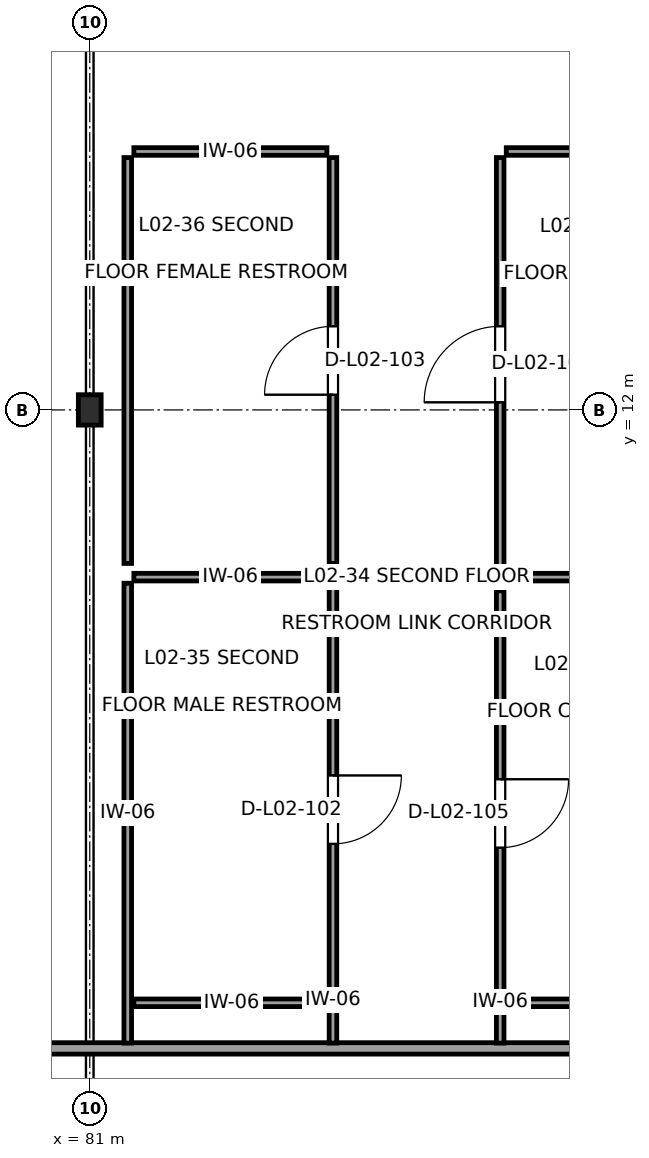
"""IFC4 building model, lengths in metres.
Left out: names, types, materials, properties, quantities, classifications, styles, units other than length and angle.
Written with IfcOpenShell. Run it as: python <this file> out.ifc"""

import sys

from ifc_helpers import new_model, si_unit, direction, frame, frame_2d, origin, origin_2d, place, context, subcontext, project, spatial, rectangle, i_section, extrude, element, fill, save


model = new_model("IFC4")
c1 = context("Model", 3, precision=1e-05, world=origin(), true_north=direction((0.0, 1.0)))
c2 = subcontext(c1, "Body", "Model", "MODEL_VIEW")
j1 = project(units=[si_unit("LENGTHUNIT", "METRE"), si_unit("PLANEANGLEUNIT", "RADIAN")], contexts=[c1])
p1 = place(None, origin())
s1 = spatial("IfcSite", under=j1, at=p1, CompositionType="ELEMENT")
p2 = place(p1, origin())
s2 = spatial("IfcBuilding", under=s1, at=p2, CompositionType="ELEMENT")
p3 = place(p2, frame((0.0, 0.0, 9.9)))
s3 = spatial("IfcBuildingStorey", under=s2, at=p3, CompositionType="ELEMENT", Elevation=9.9)
p4 = place(p3, frame((81.0, 12.0, 0.0), z_axis=(0.0, 0.0, 1.0), x_axis=(1.0, 0.0, 0.0)))
e1 = element("IfcColumn", 1, at=p4, inside=s3, PredefinedType="COLUMN", context=c2, shape_type="SweptSolid", body=[
    extrude(i_section(OverallWidth=0.3, OverallDepth=0.4, WebThickness=0.013, FlangeThickness=0.024, at=origin_2d()), origin(), (0.0, 0.0, 1.0), 4.5),
])
p5 = place(p3, frame((46.08, 3.6, 0.0), z_axis=(0.0, 0.0, 1.0), x_axis=(1.0, 0.0, 0.0)))
e2 = element("IfcWall", 2, at=p5, inside=s3, PredefinedType="PARTITIONING", context=c2, shape_type="SweptSolid", body=[
    extrude(rectangle(XDim=71.04, YDim=0.15, at=frame_2d((35.52, 0.0))), origin(), (0.0, 0.0, 1.0), 4.14),
])
p6 = place(p5, frame((27.595, 0.0, 0.0)))
e3 = element("IfcOpeningElement", 3, at=p6, cuts=e2, PredefinedType="OPENING", context=c2, shape_type="SweptSolid", body=[
    extrude(rectangle(XDim=1.05, YDim=2.25, at=frame_2d((0.525, 1.125))), frame((0.0, 0.09, 0.0), z_axis=(0.0, -1.0, 0.0), x_axis=(1.0, 0.0, 0.0)), (0.0, 0.0, 1.0), 0.18),
])
p7 = place(p3, frame((84.2, 9.72, 0.0), z_axis=(0.0, 0.0, 1.0), x_axis=(0.0, -1.0, 0.0)))
e4 = element("IfcWall", 4, at=p7, inside=s3, PredefinedType="PARTITIONING", context=c2, shape_type="SweptSolid", body=[
    extrude(rectangle(XDim=6.05, YDim=0.1, at=frame_2d((3.025, 0.0))), origin(), (0.0, 0.0, 1.0), 4.14),
])
p8 = place(p7, frame((2.529, 0.0, 0.0)))
e5 = element("IfcOpeningElement", 5, at=p8, cuts=e4, PredefinedType="OPENING", context=c2, shape_type="SweptSolid", body=[
    extrude(rectangle(XDim=0.9, YDim=2.05, at=frame_2d((0.45, 1.025))), frame((0.0, 0.065, 0.0), z_axis=(0.0, -1.0, 0.0), x_axis=(1.0, 0.0, 0.0)), (0.0, 0.0, 1.0), 0.13),
])
p9 = place(p3, frame((84.155, 4.2, 0.0), z_axis=(0.0, 0.0, 1.0), x_axis=(-1.0, 0.0, 0.0)))
e6 = element("IfcWall", 6, at=p9, inside=s3, PredefinedType="PARTITIONING", context=c2, shape_type="SweptSolid", body=[
    extrude(rectangle(XDim=2.575, YDim=0.1, at=frame_2d((1.288, 0.0))), origin(), (0.0, 0.0, 1.0), 4.14),
])
p10 = place(p3, frame((81.5, 3.67, 0.0), z_axis=(0.0, 0.0, 1.0), x_axis=(0.0, 1.0, 0.0)))
e7 = element("IfcWall", 7, at=p10, inside=s3, PredefinedType="PARTITIONING", context=c2, shape_type="SweptSolid", body=[
    extrude(rectangle(XDim=6.05, YDim=0.1, at=frame_2d((3.025, 0.0))), origin(), (0.0, 0.0, 1.0), 3.695),
])
p11 = place(p3, frame((81.58, 9.8, 0.0), z_axis=(0.0, 0.0, 1.0), x_axis=(1.0, 0.0, 0.0)))
e8 = element("IfcWall", 8, at=p11, inside=s3, PredefinedType="PARTITIONING", context=c2, shape_type="SweptSolid", body=[
    extrude(rectangle(XDim=2.54, YDim=0.1, at=frame_2d((1.27, 0.0))), origin(), (0.0, 0.0, 1.0), 4.14),
])
p12 = place(p3, frame((81.5, 9.98, 0.0), z_axis=(0.0, 0.0, 1.0), x_axis=(0.0, 1.0, 0.0)))
e9 = element("IfcWall", 9, at=p12, inside=s3, PredefinedType="PARTITIONING", context=c2, shape_type="SweptSolid", body=[
    extrude(rectangle(XDim=5.34, YDim=0.1, at=frame_2d((2.67, 0.0))), origin(), (0.0, 0.0, 1.0), 3.695),
])
p13 = place(p3, frame((81.58, 15.4, 0.0), z_axis=(0.0, 0.0, 1.0), x_axis=(1.0, 0.0, 0.0)))
e10 = element("IfcWall", 10, at=p13, inside=s3, PredefinedType="PARTITIONING", context=c2, shape_type="SweptSolid", body=[
    extrude(rectangle(XDim=2.54, YDim=0.1, at=frame_2d((1.27, 0.0))), origin(), (0.0, 0.0, 1.0), 4.14),
])
p14 = place(p3, frame((84.2, 15.32, 0.0), z_axis=(0.0, 0.0, 1.0), x_axis=(0.0, -1.0, 0.0)))
e11 = element("IfcWall", 11, at=p14, inside=s3, PredefinedType="PARTITIONING", context=c2, shape_type="SweptSolid", body=[
    extrude(rectangle(XDim=5.34, YDim=0.1, at=frame_2d((2.67, 0.0))), origin(), (0.0, 0.0, 1.0), 4.14),
])
p15 = place(p14, frame((2.22, 0.0, 0.0)))
e12 = element("IfcOpeningElement", 12, at=p15, cuts=e11, PredefinedType="OPENING", context=c2, shape_type="SweptSolid", body=[
    extrude(rectangle(XDim=0.9, YDim=2.05, at=frame_2d((0.45, 1.025))), frame((0.0, 0.065, 0.0), z_axis=(0.0, -1.0, 0.0), x_axis=(1.0, 0.0, 0.0)), (0.0, 0.0, 1.0), 0.13),
])
p16 = place(p3, frame((86.4, 9.88, 0.0), z_axis=(0.0, 0.0, 1.0), x_axis=(0.0, 1.0, 0.0)))
e13 = element("IfcWall", 13, at=p16, inside=s3, PredefinedType="PARTITIONING", context=c2, shape_type="SweptSolid", body=[
    extrude(rectangle(XDim=5.44, YDim=0.1, at=frame_2d((2.72, 0.0))), origin(), (0.0, 0.0, 1.0), 4.14),
])
p17 = place(p16, frame((2.22, 0.0, 0.0)))
e14 = element("IfcOpeningElement", 14, at=p17, cuts=e13, PredefinedType="OPENING", context=c2, shape_type="SweptSolid", body=[
    extrude(rectangle(XDim=1.0, YDim=2.1, at=frame_2d((0.5, 1.05))), frame((0.0, 0.065, 0.0), z_axis=(0.0, -1.0, 0.0), x_axis=(1.0, 0.0, 0.0)), (0.0, 0.0, 1.0), 0.13),
])
for number, where, z_axis, x_axis in (
    (15, (86.48, 15.4, 0.0), (0.0, 0.0, 1.0), (1.0, 0.0, 0.0)),
    (16, (89.02, 9.8, 0.0), (0.0, 0.0, 1.0), (-1.0, 0.0, 0.0)),
):
    element("IfcWall", number, at=place(p3, frame(where, z_axis=z_axis, x_axis=x_axis)), inside=s3, PredefinedType="PARTITIONING", context=c2, shape_type="SweptSolid", body=[
        extrude(rectangle(XDim=2.54, YDim=0.1, at=frame_2d((1.27, 0.0))), origin(), (0.0, 0.0, 1.0), 4.14),
    ])
p18 = place(p3, frame((89.055, 4.2, 0.0), z_axis=(0.0, 0.0, 1.0), x_axis=(-1.0, 0.0, 0.0)))
e17 = element("IfcWall", 17, at=p18, inside=s3, PredefinedType="PARTITIONING", context=c2, shape_type="SweptSolid", body=[
    extrude(rectangle(XDim=2.575, YDim=0.1, at=frame_2d((1.288, 0.0))), origin(), (0.0, 0.0, 1.0), 4.14),
])
p19 = place(p3, frame((86.4, 3.67, 0.0), z_axis=(0.0, 0.0, 1.0), x_axis=(0.0, 1.0, 0.0)))
e18 = element("IfcWall", 18, at=p19, inside=s3, PredefinedType="PARTITIONING", context=c2, shape_type="SweptSolid", body=[
    extrude(rectangle(XDim=5.95, YDim=0.1, at=frame_2d((2.975, 0.0))), origin(), (0.0, 0.0, 1.0), 4.14),
])
p20 = place(p19, frame((2.571, 0.0, 0.0)))
e19 = element("IfcOpeningElement", 19, at=p20, cuts=e18, PredefinedType="OPENING", context=c2, shape_type="SweptSolid", body=[
    extrude(rectangle(XDim=0.9, YDim=2.05, at=frame_2d((0.45, 1.025))), frame((0.0, 0.065, 0.0), z_axis=(0.0, -1.0, 0.0), x_axis=(1.0, 0.0, 0.0)), (0.0, 0.0, 1.0), 0.13),
])
p21 = place(p8, origin())
e20 = element("IfcDoor", 20, at=p21, inside=s3, OperationType="SINGLE_SWING_LEFT", PredefinedType="DOOR", context=c2, shape_type="SweptSolid", body=[
    extrude(rectangle(XDim=0.9, YDim=2.05, at=frame_2d((0.45, 1.025))), frame((0.0, 0.025, 0.0), z_axis=(0.0, -1.0, 0.0), x_axis=(1.0, 0.0, 0.0)), (0.0, 0.0, 1.0), 0.05),
])
fill(e5, e20)
p22 = place(p15, frame((0.9, 0.0, 0.0), z_axis=(0.0, 0.0, 1.0), x_axis=(-1.0, 0.0, 0.0)))
e21 = element("IfcDoor", 21, at=p22, inside=s3, OperationType="SINGLE_SWING_RIGHT", PredefinedType="DOOR", context=c2, shape_type="SweptSolid", body=[
    extrude(rectangle(XDim=0.9, YDim=2.05, at=frame_2d((0.45, 1.025))), frame((0.0, 0.025, 0.0), z_axis=(0.0, -1.0, 0.0), x_axis=(1.0, 0.0, 0.0)), (0.0, 0.0, 1.0), 0.05),
])
fill(e12, e21)
p23 = place(p17, origin())
e22 = element("IfcDoor", 22, at=p23, inside=s3, OperationType="SINGLE_SWING_LEFT", PredefinedType="DOOR", context=c2, shape_type="SweptSolid", body=[
    extrude(rectangle(XDim=1.0, YDim=2.1, at=frame_2d((0.5, 1.05))), frame((0.0, 0.025, 0.0), z_axis=(0.0, -1.0, 0.0), x_axis=(1.0, 0.0, 0.0)), (0.0, 0.0, 1.0), 0.05),
])
fill(e14, e22)
p24 = place(p20, frame((0.9, 0.0, 0.0), z_axis=(0.0, 0.0, 1.0), x_axis=(-1.0, 0.0, 0.0)))
e23 = element("IfcDoor", 23, at=p24, inside=s3, OperationType="SINGLE_SWING_RIGHT", PredefinedType="DOOR", context=c2, shape_type="SweptSolid", body=[
    extrude(rectangle(XDim=0.9, YDim=2.05, at=frame_2d((0.45, 1.025))), frame((0.0, 0.025, 0.0), z_axis=(0.0, -1.0, 0.0), x_axis=(1.0, 0.0, 0.0)), (0.0, 0.0, 1.0), 0.05),
])
fill(e19, e23)
save(model, sys.argv[1])
